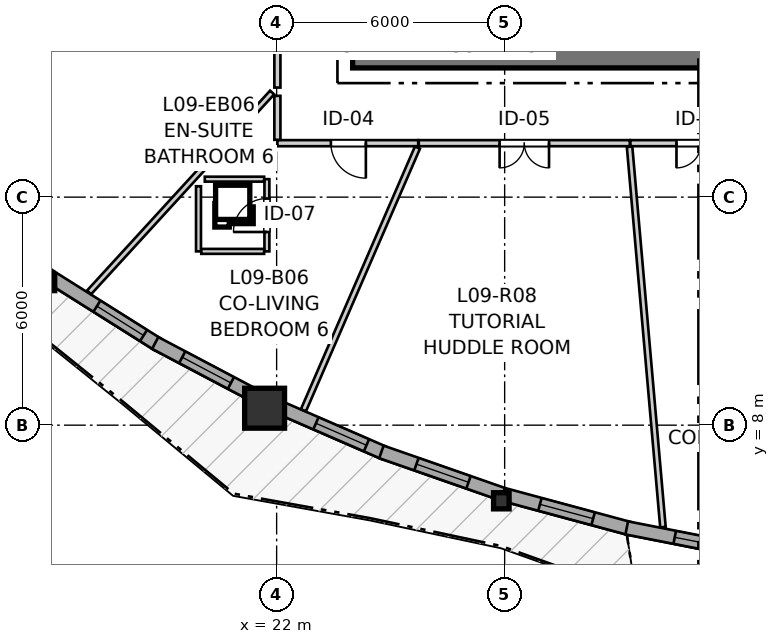
"""IFC4 building model, lengths in metres.
Left out: names, types, materials, properties, quantities, classifications, styles, units other than length and angle.
Written with IfcOpenShell. Run it as: python <this file> out.ifc"""

import sys

from ifc_helpers import new_model, si_unit, direction, frame, frame_2d, origin, origin_2d, place, context, subcontext, project, spatial, rectangle, i_section, extrude, source, transform, mapped, element, fill, save


model = new_model("IFC4")
c1 = context("Model", 3, precision=1e-05, world=origin(), true_north=direction((0.0, 1.0)))
c2 = subcontext(c1, "Body", "Model", "MODEL_VIEW")
j1 = project(units=[si_unit("LENGTHUNIT", "METRE"), si_unit("PLANEANGLEUNIT", "RADIAN")], contexts=[c1])
p1 = place(None, origin())
s1 = spatial("IfcSite", under=j1, at=p1, CompositionType="ELEMENT")
p2 = place(p1, origin())
s2 = spatial("IfcBuilding", under=s1, at=p2, CompositionType="ELEMENT")
p3 = place(p2, frame((0.0, 0.0, 33.4)))
s3 = spatial("IfcBuildingStorey", under=s2, at=p3, CompositionType="ELEMENT", Elevation=33.4)
p4 = place(p3, frame((24.0, 17.8, 0.0), z_axis=(0.0, 0.0, 1.0), x_axis=(1.0, 0.0, 0.0)))
e1 = element("IfcWall", 1, at=p4, inside=s3, PredefinedType="SHEAR", context=c2, shape_type="SweptSolid", body=[
    extrude(rectangle(XDim=12.7, YDim=0.8, at=frame_2d((6.35, 0.0))), origin(), (0.0, 0.0, 1.0), 2.94),
])
m1 = source(origin(), c2, "Body", "SweptSolid", [
    extrude(i_section(OverallWidth=0.409, OverallDepth=0.425, WebThickness=0.03, FlangeThickness=0.048, FilletRadius=0.015, at=origin_2d()), origin(), (0.0, 0.0, 1.0), 2.94),
])
p5 = place(p3, frame((15.956, 11.753, 0.0), z_axis=(0.0, 0.0, 1.0), x_axis=(1.0, 0.0, 0.0)))
e2 = element("IfcColumn", 2, at=p5, inside=s3, PredefinedType="PILASTER", context=c2, shape_type="MappedRepresentation", body=[
    mapped(m1, transform((0.0, 0.0, 0.0), x_axis=(1.0, 0.0, 0.0), y_axis=(0.0, 1.0, 0.0), z_axis=(0.0, 0.0, 1.0), scale=1.0)),
])
m2 = source(origin(), c2, "Body", "SweptSolid", [
    extrude(rectangle(XDim=1.05, YDim=1.05, at=origin_2d()), origin(), (0.0, 0.0, 1.0), 2.94),
])
p6 = place(p3, frame((21.683, 8.446, 0.0), z_axis=(0.0, 0.0, 1.0), x_axis=(1.0, 0.0, 0.0)))
e3 = element("IfcColumn", 3, at=p6, inside=s3, PredefinedType="COLUMN", context=c2, shape_type="MappedRepresentation", body=[
    mapped(m2, transform((0.0, 0.0, 0.0), x_axis=(1.0, 0.0, 0.0), y_axis=(0.0, 1.0, 0.0), z_axis=(0.0, 0.0, 1.0), scale=1.0)),
])
p7 = place(p3, frame((27.913, 6.01, 0.0), z_axis=(0.0, 0.0, 1.0), x_axis=(1.0, 0.0, 0.0)))
e4 = element("IfcColumn", 4, at=p7, inside=s3, PredefinedType="PILASTER", context=c2, shape_type="MappedRepresentation", body=[
    mapped(m1, transform((0.0, 0.0, 0.0), x_axis=(1.0, 0.0, 0.0), y_axis=(0.0, 1.0, 0.0), z_axis=(0.0, 0.0, 1.0), scale=1.0)),
])
p8 = place(p3, frame((13.355, 13.896, 0.0), z_axis=(0.0, 0.0, 1.0), x_axis=(0.803836316566, -0.594850549441, 0.0)))
e5 = element("IfcWall", 5, at=p8, inside=s3, PredefinedType="SOLIDWALL", context=c2, shape_type="SweptSolid", body=[
    extrude(rectangle(XDim=3.346, YDim=0.35, at=frame_2d((1.673, 0.0))), origin(), (0.0, 0.0, 1.0), 2.42),
])
p9 = place(p8, frame((1.108, 0.0, 0.82)))
e6 = element("IfcOpeningElement", 6, at=p9, cuts=e5, PredefinedType="OPENING", context=c2, shape_type="SweptSolid", body=[
    extrude(rectangle(XDim=1.15, YDim=1.2, at=frame_2d((0.575, 0.6))), frame((0.0, 0.185, 0.0), z_axis=(0.0, -1.0, 0.0), x_axis=(1.0, 0.0, 0.0)), (0.0, 0.0, 1.0), 0.37),
])
p10 = place(p3, frame((16.066, 11.89, 0.0), z_axis=(0.0, 0.0, 1.0), x_axis=(0.846403135518, -0.532542704565, 0.0)))
e7 = element("IfcWall", 7, at=p10, inside=s3, PredefinedType="SOLIDWALL", context=c2, shape_type="SweptSolid", body=[
    extrude(rectangle(XDim=3.327, YDim=0.35, at=frame_2d((1.664, 0.0))), origin(), (0.0, 0.0, 1.0), 2.42),
])
p11 = place(p10, frame((1.424, 0.0, 0.82)))
e8 = element("IfcOpeningElement", 8, at=p11, cuts=e7, PredefinedType="OPENING", context=c2, shape_type="SweptSolid", body=[
    extrude(rectangle(XDim=1.45, YDim=1.25, at=frame_2d((0.725, 0.625))), frame((0.0, 0.185, 0.0), z_axis=(0.0, -1.0, 0.0), x_axis=(1.0, 0.0, 0.0)), (0.0, 0.0, 1.0), 0.37),
])
p12 = place(p3, frame((18.805, 10.163, 0.0), z_axis=(0.0, 0.0, 1.0), x_axis=(0.884387509242, -0.466753396877, 0.0)))
e9 = element("IfcWall", 9, at=p12, inside=s3, PredefinedType="SOLIDWALL", context=c2, shape_type="SweptSolid", body=[
    extrude(rectangle(XDim=3.047, YDim=0.35, at=frame_2d((1.523, 0.0))), origin(), (0.0, 0.0, 1.0), 2.42),
])
p13 = place(p12, frame((0.803, 0.0, 0.82)))
e10 = element("IfcOpeningElement", 10, at=p13, cuts=e9, PredefinedType="OPENING", context=c2, shape_type="SweptSolid", body=[
    extrude(rectangle(XDim=1.45, YDim=1.25, at=frame_2d((0.725, 0.625))), frame((0.0, 0.185, 0.0), z_axis=(0.0, -1.0, 0.0), x_axis=(1.0, 0.0, 0.0)), (0.0, 0.0, 1.0), 0.37),
])
p14 = place(p3, frame((22.028, 8.487, 0.0), z_axis=(0.0, 0.0, 1.0), x_axis=(0.917081449464, -0.398699906006, 0.0)))
e11 = element("IfcWall", 11, at=p14, inside=s3, PredefinedType="SOLIDWALL", context=c2, shape_type="SweptSolid", body=[
    extrude(rectangle(XDim=3.066, YDim=0.35, at=frame_2d((1.533, 0.0))), origin(), (0.0, 0.0, 1.0), 2.42),
])
p15 = place(p14, frame((1.097, 0.0, 0.82)))
e12 = element("IfcOpeningElement", 12, at=p15, cuts=e11, PredefinedType="OPENING", context=c2, shape_type="SweptSolid", body=[
    extrude(rectangle(XDim=1.45, YDim=1.25, at=frame_2d((0.725, 0.625))), frame((0.0, 0.185, 0.0), z_axis=(0.0, -1.0, 0.0), x_axis=(1.0, 0.0, 0.0)), (0.0, 0.0, 1.0), 0.37),
])
p16 = place(p3, frame((24.757, 7.297, 0.0), z_axis=(0.0, 0.0, 1.0), x_axis=(0.944122401027, -0.329595042254, 0.0)))
e13 = element("IfcWall", 13, at=p16, inside=s3, PredefinedType="SOLIDWALL", context=c2, shape_type="SweptSolid", body=[
    extrude(rectangle(XDim=3.384, YDim=0.35, at=frame_2d((1.692, 0.0))), origin(), (0.0, 0.0, 1.0), 2.42),
])
p17 = place(p16, frame((0.977, 0.0, 0.82)))
e14 = element("IfcOpeningElement", 14, at=p17, cuts=e13, PredefinedType="OPENING", context=c2, shape_type="SweptSolid", body=[
    extrude(rectangle(XDim=1.45, YDim=1.25, at=frame_2d((0.725, 0.625))), frame((0.0, 0.185, 0.0), z_axis=(0.0, -1.0, 0.0), x_axis=(1.0, 0.0, 0.0)), (0.0, 0.0, 1.0), 0.37),
])
p18 = place(p3, frame((27.978, 6.174, 0.0), z_axis=(0.0, 0.0, 1.0), x_axis=(0.965451765427, -0.260581827136, 0.0)))
e15 = element("IfcWall", 15, at=p18, inside=s3, PredefinedType="SOLIDWALL", context=c2, shape_type="SweptSolid", body=[
    extrude(rectangle(XDim=3.439, YDim=0.35, at=frame_2d((1.72, 0.0))), origin(), (0.0, 0.0, 1.0), 2.42),
])
p19 = place(p18, frame((0.985, 0.0, 0.82)))
e16 = element("IfcOpeningElement", 16, at=p19, cuts=e15, PredefinedType="OPENING", context=c2, shape_type="SweptSolid", body=[
    extrude(rectangle(XDim=1.45, YDim=1.25, at=frame_2d((0.725, 0.625))), frame((0.0, 0.185, 0.0), z_axis=(0.0, -1.0, 0.0), x_axis=(1.0, 0.0, 0.0)), (0.0, 0.0, 1.0), 0.37),
])
p20 = place(p3, frame((31.213, 5.298, 0.0), z_axis=(0.0, 0.0, 1.0), x_axis=(0.9812345335, -0.192818023709, 0.0)))
e17 = element("IfcWall", 17, at=p20, inside=s3, PredefinedType="SOLIDWALL", context=c2, shape_type="SweptSolid", body=[
    extrude(rectangle(XDim=3.232, YDim=0.35, at=frame_2d((1.616, 0.0))), origin(), (0.0, 0.0, 1.0), 2.42),
])
p21 = place(p20, frame((1.287, 0.0, 0.82)))
e18 = element("IfcOpeningElement", 18, at=p21, cuts=e17, PredefinedType="OPENING", context=c2, shape_type="SweptSolid", body=[
    extrude(rectangle(XDim=1.45, YDim=1.25, at=frame_2d((0.725, 0.625))), frame((0.0, 0.185, 0.0), z_axis=(0.0, -1.0, 0.0), x_axis=(1.0, 0.0, 0.0)), (0.0, 0.0, 1.0), 0.37),
])
p22 = place(p3, frame((22.02, 16.883, 0.0), z_axis=(0.0, 0.0, 1.0), x_axis=(0.0, 1.0, 0.0)))
e19 = element("IfcWall", 19, at=p22, inside=s3, PredefinedType="PARTITIONING", context=c2, shape_type="SweptSolid", body=[
    extrude(rectangle(XDim=7.267, YDim=0.16, at=frame_2d((3.633, 0.0))), origin(), (0.0, 0.0, 1.0), 2.94),
])
p23 = place(p22, frame((2.845, 0.0, 0.0)))
e20 = element("IfcOpeningElement", 20, at=p23, cuts=e19, PredefinedType="OPENING", context=c2, shape_type="SweptSolid", body=[
    extrude(rectangle(XDim=1.3, YDim=2.1, at=frame_2d((0.65, 1.05))), frame((0.0, 0.09, 0.0), z_axis=(0.0, -1.0, 0.0), x_axis=(1.0, 0.0, 0.0)), (0.0, 0.0, 1.0), 0.18),
])
p24 = place(p3, frame((31.294, 15.42, 0.0), z_axis=(0.0, 0.0, 1.0), x_axis=(-1.0, 0.0, 0.0)))
e21 = element("IfcWall", 21, at=p24, inside=s3, PredefinedType="PARTITIONING", context=c2, shape_type="SweptSolid", body=[
    extrude(rectangle(XDim=5.554, YDim=0.16, at=frame_2d((2.777, 0.0))), origin(), (0.0, 0.0, 1.0), 2.94),
])
p25 = place(p24, frame((2.126, 0.0, 0.0)))
e22 = element("IfcOpeningElement", 22, at=p25, cuts=e21, PredefinedType="OPENING", context=c2, shape_type="SweptSolid", body=[
    extrude(rectangle(XDim=1.3, YDim=2.1, at=frame_2d((0.65, 1.05))), frame((0.0, 0.09, 0.0), z_axis=(0.0, -1.0, 0.0), x_axis=(1.0, 0.0, 0.0)), (0.0, 0.0, 1.0), 0.18),
])
p26 = place(p3, frame((35.08, 15.42, 0.0), z_axis=(0.0, 0.0, 1.0), x_axis=(-1.0, 0.0, 0.0)))
e23 = element("IfcWall", 23, at=p26, inside=s3, PredefinedType="PARTITIONING", context=c2, shape_type="SweptSolid", body=[
    extrude(rectangle(XDim=3.771, YDim=0.16, at=frame_2d((1.885, 0.0))), origin(), (0.0, 0.0, 1.0), 2.94),
])
p27 = place(p26, frame((1.259, 0.0, 0.0)))
e24 = element("IfcOpeningElement", 24, at=p27, cuts=e23, PredefinedType="OPENING", context=c2, shape_type="SweptSolid", body=[
    extrude(rectangle(XDim=1.3, YDim=2.1, at=frame_2d((0.65, 1.05))), frame((0.0, 0.09, 0.0), z_axis=(0.0, -1.0, 0.0), x_axis=(1.0, 0.0, 0.0)), (0.0, 0.0, 1.0), 0.18),
])
p28 = place(p3, frame((25.725, 15.42, 0.0), z_axis=(0.0, 0.0, 1.0), x_axis=(-1.0, 0.0, 0.0)))
e25 = element("IfcWall", 25, at=p28, inside=s3, PredefinedType="PARTITIONING", context=c2, shape_type="SweptSolid", body=[
    extrude(rectangle(XDim=3.705, YDim=0.16, at=frame_2d((1.853, 0.0))), origin(), (0.0, 0.0, 1.0), 2.94),
])
p29 = place(p28, frame((1.377, 0.0, 0.0)))
e26 = element("IfcOpeningElement", 26, at=p29, cuts=e25, PredefinedType="OPENING", context=c2, shape_type="SweptSolid", body=[
    extrude(rectangle(XDim=0.92, YDim=2.1, at=frame_2d((0.46, 1.05))), frame((0.0, 0.09, 0.0), z_axis=(0.0, -1.0, 0.0), x_axis=(1.0, 0.0, 0.0)), (0.0, 0.0, 1.0), 0.18),
])
p30 = place(p3, frame((21.744, 12.573, 0.0), z_axis=(0.0, 0.0, 1.0), x_axis=(0.0, 1.0, 0.0)))
e27 = element("IfcWall", 27, at=p30, inside=s3, PredefinedType="PARTITIONING", context=c2, shape_type="SweptSolid", body=[
    extrude(rectangle(XDim=1.9, YDim=0.13, at=frame_2d((0.95, 0.0))), origin(), (0.0, 0.0, 1.0), 2.94),
])
p31 = place(p30, frame((0.51, 0.0, 0.0)))
e28 = element("IfcOpeningElement", 28, at=p31, cuts=e27, PredefinedType="OPENING", context=c2, shape_type="SweptSolid", body=[
    extrude(rectangle(XDim=0.88, YDim=2.05, at=frame_2d((0.44, 1.025))), frame((0.0, 0.075, 0.0), z_axis=(0.0, -1.0, 0.0), x_axis=(1.0, 0.0, 0.0)), (0.0, 0.0, 1.0), 0.15),
])
p32 = place(p3, frame((31.287, 15.326, 0.0), z_axis=(0.0, 0.0, 1.0), x_axis=(0.087404477037, -0.99617290537, 0.0)))
e29 = element("IfcWall", 29, at=p32, inside=s3, PredefinedType="PARTITIONING", context=c2, shape_type="SweptSolid", body=[
    extrude(rectangle(XDim=10.047, YDim=0.145, at=frame_2d((5.023, 0.0))), origin(), (0.0, 0.0, 1.0), 2.94),
])
p33 = place(p3, frame((22.705, 8.392, 0.0), z_axis=(0.0, 0.0, 1.0), x_axis=(0.398228422372, 0.917286282256, 0.0)))
e30 = element("IfcWall", 30, at=p33, inside=s3, PredefinedType="PARTITIONING", context=c2, shape_type="SweptSolid", body=[
    extrude(rectangle(XDim=7.535, YDim=0.145, at=frame_2d((3.767, 0.0))), origin(), (0.0, 0.0, 1.0), 2.94),
])
p34 = place(p3, frame((17.064, 11.493, 0.0), z_axis=(0.0, 0.0, 1.0), x_axis=(0.67534166785, 0.737505004502, 0.0)))
e31 = element("IfcWall", 31, at=p34, inside=s3, PredefinedType="PARTITIONING", context=c2, shape_type="SweptSolid", body=[
    extrude(rectangle(XDim=7.132, YDim=0.145, at=frame_2d((3.566, 0.0))), origin(), (0.0, 0.0, 1.0), 2.94),
])
p35 = place(p3, frame((19.944, 12.573, 0.0), z_axis=(0.0, 0.0, 1.0), x_axis=(0.0, 1.0, 0.0)))
e32 = element("IfcWall", 32, at=p35, inside=s3, PredefinedType="PARTITIONING", context=c2, shape_type="SweptSolid", body=[
    extrude(rectangle(XDim=1.714, YDim=0.13, at=frame_2d((0.857, 0.0))), origin(), (0.0, 0.0, 1.0), 2.94),
])
p36 = place(p3, frame((20.11, 14.473, 0.0), z_axis=(0.0, 0.0, 1.0), x_axis=(1.0, 0.0, 0.0)))
e33 = element("IfcWall", 33, at=p36, inside=s3, PredefinedType="PARTITIONING", context=c2, shape_type="SweptSolid", body=[
    extrude(rectangle(XDim=1.561, YDim=0.13, at=frame_2d((0.781, 0.0))), origin(), (0.0, 0.0, 1.0), 2.94),
])
p37 = place(p3, frame((20.017, 12.573, 0.0), z_axis=(0.0, 0.0, 1.0), x_axis=(1.0, 0.0, 0.0)))
e34 = element("IfcWall", 34, at=p37, inside=s3, PredefinedType="PARTITIONING", context=c2, shape_type="SweptSolid", body=[
    extrude(rectangle(XDim=1.654, YDim=0.13, at=frame_2d((0.827, 0.0))), origin(), (0.0, 0.0, 1.0), 2.94),
])
p38 = place(p3, frame((22.02, 15.508, 0.0), z_axis=(0.0, 0.0, 1.0), x_axis=(0.0, 1.0, 0.0)))
e35 = element("IfcWall", 35, at=p38, inside=s3, PredefinedType="PARTITIONING", context=c2, shape_type="SweptSolid", body=[
    extrude(rectangle(XDim=1.157, YDim=0.16, at=frame_2d((0.579, 0.0))), origin(), (0.0, 0.0, 1.0), 2.94),
])
m3 = source(origin(), c2, "Body", "SweptSolid", [
    extrude(rectangle(XDim=1.45, YDim=1.25, at=frame_2d((0.725, 0.625))), frame((0.0, 0.03, 0.0), z_axis=(0.0, -1.0, 0.0), x_axis=(1.0, 0.0, 0.0)), (0.0, 0.0, 1.0), 0.06),
])
p39 = place(p11, origin())
e36 = element("IfcWindow", 36, at=p39, inside=s3, PartitioningType="SINGLE_PANEL", PredefinedType="WINDOW", context=c2, shape_type="MappedRepresentation", body=[
    mapped(m3, transform((0.0, 0.0, 0.0), x_axis=(1.0, 0.0, 0.0), y_axis=(0.0, 1.0, 0.0), z_axis=(0.0, 0.0, 1.0), scale=1.0)),
])
fill(e8, e36)
p40 = place(p13, origin())
e37 = element("IfcWindow", 37, at=p40, inside=s3, PartitioningType="SINGLE_PANEL", PredefinedType="WINDOW", context=c2, shape_type="MappedRepresentation", body=[
    mapped(m3, transform((0.0, 0.0, 0.0), x_axis=(1.0, 0.0, 0.0), y_axis=(0.0, 1.0, 0.0), z_axis=(0.0, 0.0, 1.0), scale=1.0)),
])
fill(e10, e37)
p41 = place(p15, origin())
e38 = element("IfcWindow", 38, at=p41, inside=s3, PartitioningType="SINGLE_PANEL", PredefinedType="WINDOW", context=c2, shape_type="MappedRepresentation", body=[
    mapped(m3, transform((0.0, 0.0, 0.0), x_axis=(1.0, 0.0, 0.0), y_axis=(0.0, 1.0, 0.0), z_axis=(0.0, 0.0, 1.0), scale=1.0)),
])
fill(e12, e38)
p42 = place(p17, origin())
e39 = element("IfcWindow", 39, at=p42, inside=s3, PartitioningType="SINGLE_PANEL", PredefinedType="WINDOW", context=c2, shape_type="MappedRepresentation", body=[
    mapped(m3, transform((0.0, 0.0, 0.0), x_axis=(1.0, 0.0, 0.0), y_axis=(0.0, 1.0, 0.0), z_axis=(0.0, 0.0, 1.0), scale=1.0)),
])
fill(e14, e39)
p43 = place(p19, origin())
e40 = element("IfcWindow", 40, at=p43, inside=s3, PartitioningType="SINGLE_PANEL", PredefinedType="WINDOW", context=c2, shape_type="MappedRepresentation", body=[
    mapped(m3, transform((0.0, 0.0, 0.0), x_axis=(1.0, 0.0, 0.0), y_axis=(0.0, 1.0, 0.0), z_axis=(0.0, 0.0, 1.0), scale=1.0)),
])
fill(e16, e40)
p44 = place(p21, origin())
e41 = element("IfcWindow", 41, at=p44, inside=s3, PartitioningType="SINGLE_PANEL", PredefinedType="WINDOW", context=c2, shape_type="MappedRepresentation", body=[
    mapped(m3, transform((0.0, 0.0, 0.0), x_axis=(1.0, 0.0, 0.0), y_axis=(0.0, 1.0, 0.0), z_axis=(0.0, 0.0, 1.0), scale=1.0)),
])
fill(e18, e41)
m4 = source(origin(), c2, "Body", "SweptSolid", [
    extrude(rectangle(XDim=1.3, YDim=2.1, at=frame_2d((0.65, 1.05))), frame((0.0, 0.025, 0.0), z_axis=(0.0, -1.0, 0.0), x_axis=(1.0, 0.0, 0.0)), (0.0, 0.0, 1.0), 0.05),
])
p45 = place(p25, origin())
e42 = element("IfcDoor", 42, at=p45, inside=s3, OperationType="DOUBLE_DOOR_SINGLE_SWING", PredefinedType="DOOR", context=c2, shape_type="MappedRepresentation", body=[
    mapped(m4, transform((0.0, 0.0, 0.0), x_axis=(1.0, 0.0, 0.0), y_axis=(0.0, 1.0, 0.0), z_axis=(0.0, 0.0, 1.0), scale=1.0)),
])
fill(e22, e42)
p46 = place(p27, origin())
e43 = element("IfcDoor", 43, at=p46, inside=s3, OperationType="DOUBLE_DOOR_SINGLE_SWING", PredefinedType="DOOR", context=c2, shape_type="MappedRepresentation", body=[
    mapped(m4, transform((0.0, 0.0, 0.0), x_axis=(1.0, 0.0, 0.0), y_axis=(0.0, 1.0, 0.0), z_axis=(0.0, 0.0, 1.0), scale=1.0)),
])
fill(e24, e43)
m5 = source(origin(), c2, "Body", "SweptSolid", [
    extrude(rectangle(XDim=0.92, YDim=2.1, at=frame_2d((0.46, 1.05))), frame((0.0, 0.025, 0.0), z_axis=(0.0, -1.0, 0.0), x_axis=(1.0, 0.0, 0.0)), (0.0, 0.0, 1.0), 0.05),
])
p47 = place(p29, origin())
e44 = element("IfcDoor", 44, at=p47, inside=s3, OperationType="SINGLE_SWING_LEFT", PredefinedType="DOOR", context=c2, shape_type="MappedRepresentation", body=[
    mapped(m5, transform((0.0, 0.0, 0.0), x_axis=(1.0, 0.0, 0.0), y_axis=(0.0, 1.0, 0.0), z_axis=(0.0, 0.0, 1.0), scale=1.0)),
])
fill(e26, e44)
m6 = source(origin(), c2, "Body", "SweptSolid", [
    extrude(rectangle(XDim=0.88, YDim=2.05, at=frame_2d((0.44, 1.025))), frame((0.0, 0.025, 0.0), z_axis=(0.0, -1.0, 0.0), x_axis=(1.0, 0.0, 0.0)), (0.0, 0.0, 1.0), 0.05),
])
p48 = place(p31, origin())
e45 = element("IfcDoor", 45, at=p48, inside=s3, OperationType="SINGLE_SWING_LEFT", PredefinedType="DOOR", context=c2, shape_type="MappedRepresentation", body=[
    mapped(m6, transform((0.0, 0.0, 0.0), x_axis=(1.0, 0.0, 0.0), y_axis=(0.0, 1.0, 0.0), z_axis=(0.0, 0.0, 1.0), scale=1.0)),
])
fill(e28, e45)
save(model, sys.argv[1])
